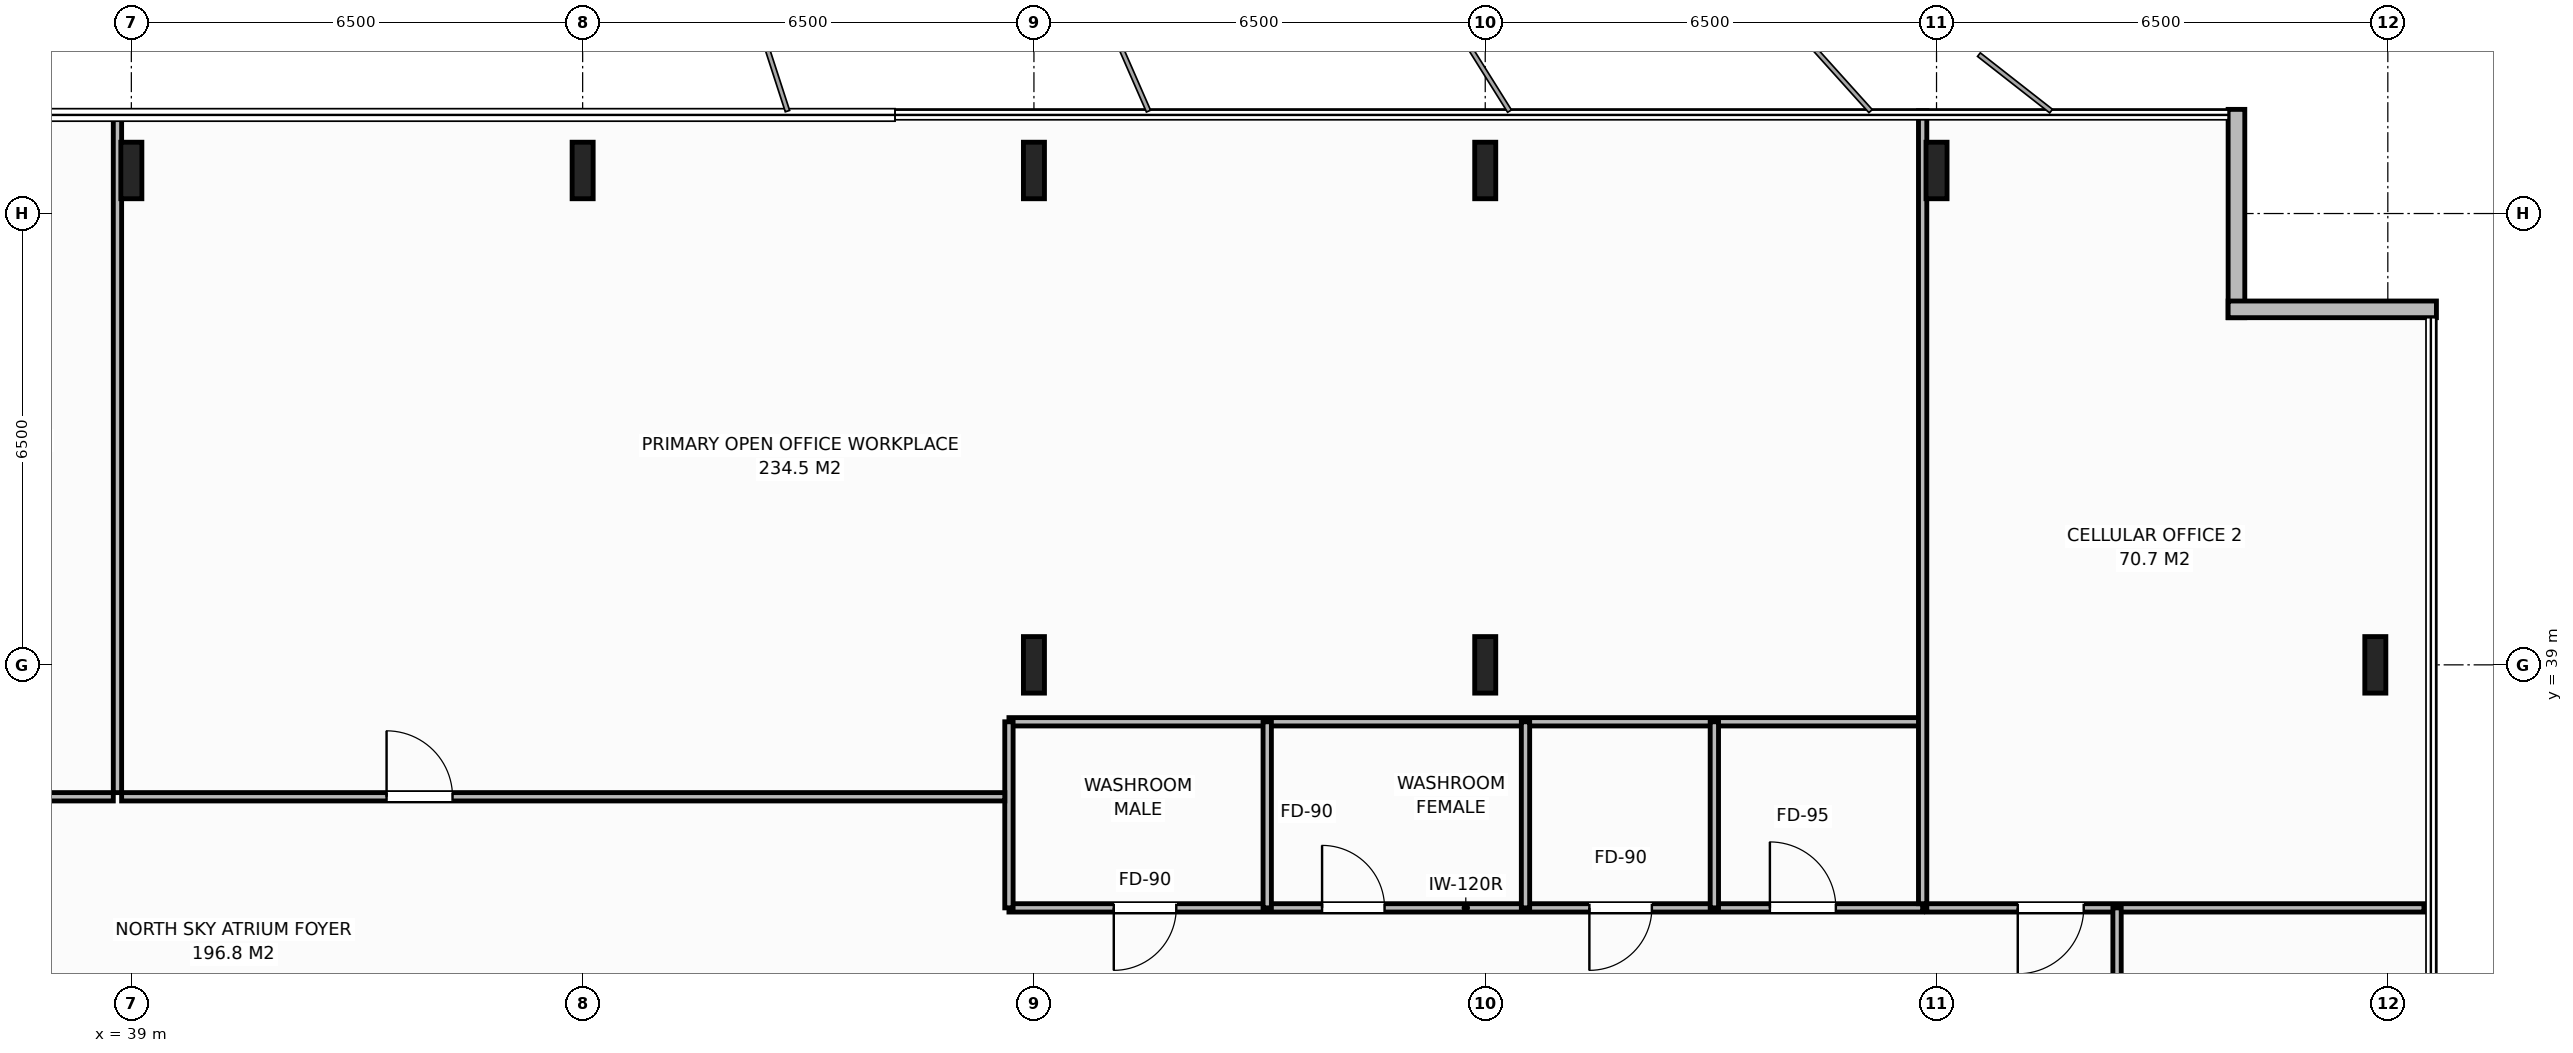
"""IFC4 building model, lengths in metres.
Left out: names, types, materials, properties, quantities, classifications, styles, units other than length and angle.
Written with IfcOpenShell. Run it as: python <this file> out.ifc"""

import sys

from ifc_helpers import new_model, si_unit, direction, frame, frame_2d, origin, origin_2d, place, context, subcontext, project, spatial, rectangle, i_section, extrude, element, fill, save


model = new_model("IFC4")
c1 = context("Model", 3, precision=1e-05, world=origin(), true_north=direction((0.0, 1.0)))
c2 = subcontext(c1, "Body", "Model", "MODEL_VIEW")
j1 = project(units=[si_unit("LENGTHUNIT", "METRE"), si_unit("PLANEANGLEUNIT", "RADIAN")], contexts=[c1])
p1 = place(None, origin())
s1 = spatial("IfcSite", under=j1, at=p1, CompositionType="ELEMENT")
p2 = place(p1, origin())
s2 = spatial("IfcBuilding", under=s1, at=p2, CompositionType="ELEMENT")
p3 = place(p2, frame((0.0, 0.0, 251.8)))
s3 = spatial("IfcBuildingStorey", under=s2, at=p3, CompositionType="ELEMENT", Elevation=251.8)
for number, where, z_axis, x_axis in (
    (1, (58.5, 39.0, 0.0), (0.0, 0.0, 1.0), (1.0, 0.0, 0.0)),
    (2, (52.0, 39.0, 0.0), (0.0, 0.0, 1.0), (1.0, 0.0, 0.0)),
    (3, (39.0, 46.12, 0.0), (0.0, 0.0, 1.0), (1.0, 0.0, 0.0)),
    (4, (45.5, 46.12, 0.0), (0.0, 0.0, 1.0), (1.0, 0.0, 0.0)),
    (5, (52.0, 46.12, 0.0), (0.0, 0.0, 1.0), (1.0, 0.0, 0.0)),
    (6, (58.5, 46.12, 0.0), (0.0, 0.0, 1.0), (1.0, 0.0, 0.0)),
    (7, (65.0, 46.12, 0.0), (0.0, 0.0, 1.0), (1.0, 0.0, 0.0)),
    (8, (71.32, 39.0, 0.0), (0.0, 0.0, 1.0), (1.0, 0.0, 0.0)),
):
    element("IfcColumn", number, at=place(p3, frame(where, z_axis=z_axis, x_axis=x_axis)), inside=s3, PredefinedType="COLUMN", context=c2, shape_type="SweptSolid", body=[
        extrude(i_section(OverallWidth=0.303, OverallDepth=0.814, WebThickness=0.021, FlangeThickness=0.04, at=origin_2d()), origin(), (0.0, 0.0, 1.0), 3.8),
    ])
for number, where, z_axis, x_axis in (
    (9, (69.32, 47.0, 0.0), (0.0, 0.0, 1.0), (0.0, -1.0, 0.0)),
    (10, (69.2, 44.12, 0.0), (0.0, 0.0, 1.0), (1.0, 0.0, 0.0)),
):
    element("IfcWall", number, at=place(p3, frame(where, z_axis=z_axis, x_axis=x_axis)), inside=s3, PredefinedType="STANDARD", context=c2, shape_type="SweptSolid", body=[
        extrude(rectangle(XDim=3.0, YDim=0.24, at=frame_2d((1.5, 0.0))), origin(), (0.0, 0.0, 1.0), 3.588),
    ])
p4 = place(p3, frame((51.64, 35.5, 0.0), z_axis=(0.0, 0.0, 1.0), x_axis=(1.0, 0.0, 0.0)))
e11 = element("IfcWall", 11, at=p4, inside=s3, PredefinedType="PARTITIONING", context=c2, shape_type="SweptSolid", body=[
    extrude(rectangle(XDim=13.16, YDim=0.12, at=frame_2d((6.58, 0.0))), origin(), (0.0, 0.0, 1.0), 3.588),
])
p5 = place(p4, frame((1.51, 0.0, 0.0)))
e12 = element("IfcOpeningElement", 12, at=p5, cuts=e11, PredefinedType="OPENING", context=c2, shape_type="SweptSolid", body=[
    extrude(rectangle(XDim=0.9, YDim=2.15, at=frame_2d((0.45, 1.075))), frame((0.0, 0.07, 0.0), z_axis=(0.0, -1.0, 0.0), x_axis=(1.0, 0.0, 0.0)), (0.0, 0.0, 1.0), 0.14),
])
p6 = place(p4, frame((4.51, 0.0, 0.0)))
e13 = element("IfcOpeningElement", 13, at=p6, cuts=e11, PredefinedType="OPENING", context=c2, shape_type="SweptSolid", body=[
    extrude(rectangle(XDim=0.9, YDim=2.15, at=frame_2d((0.45, 1.075))), frame((0.0, 0.07, 0.0), z_axis=(0.0, -1.0, 0.0), x_axis=(1.0, 0.0, 0.0)), (0.0, 0.0, 1.0), 0.14),
])
p7 = place(p4, frame((8.36, 0.0, 0.0)))
e14 = element("IfcOpeningElement", 14, at=p7, cuts=e11, PredefinedType="OPENING", context=c2, shape_type="SweptSolid", body=[
    extrude(rectangle(XDim=0.9, YDim=2.15, at=frame_2d((0.45, 1.075))), frame((0.0, 0.07, 0.0), z_axis=(0.0, -1.0, 0.0), x_axis=(1.0, 0.0, 0.0)), (0.0, 0.0, 1.0), 0.14),
])
p8 = place(p4, frame((10.96, 0.0, 0.0)))
e15 = element("IfcOpeningElement", 15, at=p8, cuts=e11, PredefinedType="OPENING", context=c2, shape_type="SweptSolid", body=[
    extrude(rectangle(XDim=0.95, YDim=2.15, at=frame_2d((0.475, 1.075))), frame((0.0, 0.07, 0.0), z_axis=(0.0, -1.0, 0.0), x_axis=(1.0, 0.0, 0.0)), (0.0, 0.0, 1.0), 0.14),
])
p9 = place(p3, frame((51.64, 38.18, 0.0), z_axis=(0.0, 0.0, 1.0), x_axis=(1.0, 0.0, 0.0)))
e16 = element("IfcWall", 16, at=p9, inside=s3, PredefinedType="PARTITIONING", context=c2, shape_type="SweptSolid", body=[
    extrude(rectangle(XDim=13.16, YDim=0.12, at=frame_2d((6.58, 0.0))), origin(), (0.0, 0.0, 1.0), 3.588),
])
p10 = place(p3, frame((51.64, 35.5, 0.0), z_axis=(0.0, 0.0, 1.0), x_axis=(0.0, 1.0, 0.0)))
e17 = element("IfcWall", 17, at=p10, inside=s3, PredefinedType="PARTITIONING", context=c2, shape_type="SweptSolid", body=[
    extrude(rectangle(XDim=2.68, YDim=0.12, at=frame_2d((1.34, 0.0))), origin(), (0.0, 0.0, 1.0), 2.388),
])
for number, where, z_axis, x_axis in (
    (18, (55.36, 35.5, 0.0), (0.0, 0.0, 1.0), (0.0, 1.0, 0.0)),
    (19, (59.08, 35.5, 0.0), (0.0, 0.0, 1.0), (0.0, 1.0, 0.0)),
    (20, (61.8, 35.5, 0.0), (0.0, 0.0, 1.0), (0.0, 1.0, 0.0)),
):
    element("IfcWall", number, at=place(p3, frame(where, z_axis=z_axis, x_axis=x_axis)), inside=s3, PredefinedType="PARTITIONING", context=c2, shape_type="SweptSolid", body=[
        extrude(rectangle(XDim=2.68, YDim=0.12, at=frame_2d((1.34, 0.0))), origin(), (0.0, 0.0, 1.0), 3.588),
    ])
p11 = place(p3, frame((38.8, 37.16, 0.0), z_axis=(0.0, 0.0, 1.0), x_axis=(0.0, 1.0, 0.0)))
e21 = element("IfcWall", 21, at=p11, inside=s3, PredefinedType="PARTITIONING", context=c2, shape_type="SweptSolid", body=[
    extrude(rectangle(XDim=9.82, YDim=0.12, at=frame_2d((4.91, 0.0))), origin(), (0.0, 0.0, 1.0), 2.388),
])
p12 = place(p3, frame((34.67, 37.1, 0.0), z_axis=(0.0, 0.0, 1.0), x_axis=(1.0, 0.0, 0.0)))
e22 = element("IfcWall", 22, at=p12, inside=s3, PredefinedType="PARTITIONING", context=c2, shape_type="SweptSolid", body=[
    extrude(rectangle(XDim=4.07, YDim=0.12, at=frame_2d((2.035, 0.0))), origin(), (0.0, 0.0, 1.0), 3.588),
])
p13 = place(p12, frame((1.56, 0.0, 0.0)))
e23 = element("IfcOpeningElement", 23, at=p13, cuts=e22, PredefinedType="OPENING", context=c2, shape_type="SweptSolid", body=[
    extrude(rectangle(XDim=0.95, YDim=2.15, at=frame_2d((0.475, 1.075))), frame((0.0, 0.07, 0.0), z_axis=(0.0, -1.0, 0.0), x_axis=(1.0, 0.0, 0.0)), (0.0, 0.0, 1.0), 0.14),
])
p14 = place(p3, frame((64.8, 35.56, 0.0), z_axis=(0.0, 0.0, 1.0), x_axis=(0.0, 1.0, 0.0)))
e24 = element("IfcWall", 24, at=p14, inside=s3, PredefinedType="PARTITIONING", context=c2, shape_type="SweptSolid", body=[
    extrude(rectangle(XDim=11.42, YDim=0.12, at=frame_2d((5.71, 0.0))), origin(), (0.0, 0.0, 1.0), 2.388),
])
p15 = place(p3, frame((38.86, 37.1, 0.0), z_axis=(0.0, 0.0, 1.0), x_axis=(1.0, 0.0, 0.0)))
e25 = element("IfcWall", 25, at=p15, inside=s3, PredefinedType="PARTITIONING", context=c2, shape_type="SweptSolid", body=[
    extrude(rectangle(XDim=12.72, YDim=0.12, at=frame_2d((6.36, 0.0))), origin(), (0.0, 0.0, 1.0), 3.588),
])
p16 = place(p15, frame((3.816, 0.0, 0.0)))
e26 = element("IfcOpeningElement", 26, at=p16, cuts=e25, PredefinedType="OPENING", context=c2, shape_type="SweptSolid", body=[
    extrude(rectangle(XDim=0.95, YDim=2.15, at=frame_2d((0.475, 1.075))), frame((0.0, 0.07, 0.0), z_axis=(0.0, -1.0, 0.0), x_axis=(1.0, 0.0, 0.0)), (0.0, 0.0, 1.0), 0.14),
])
p17 = place(p3, frame((64.86, 35.5, 0.0), z_axis=(0.0, 0.0, 1.0), x_axis=(1.0, 0.0, 0.0)))
e27 = element("IfcWall", 27, at=p17, inside=s3, PredefinedType="PARTITIONING", context=c2, shape_type="SweptSolid", body=[
    extrude(rectangle(XDim=7.16, YDim=0.12, at=frame_2d((3.58, 0.0))), origin(), (0.0, 0.0, 1.0), 3.588),
])
p18 = place(p17, frame((1.31, 0.0, 0.0)))
e28 = element("IfcOpeningElement", 28, at=p18, cuts=e27, PredefinedType="OPENING", context=c2, shape_type="SweptSolid", body=[
    extrude(rectangle(XDim=0.95, YDim=2.15, at=frame_2d((0.475, 1.075))), frame((0.0, 0.07, 0.0), z_axis=(0.0, -1.0, 0.0), x_axis=(1.0, 0.0, 0.0)), (0.0, 0.0, 1.0), 0.14),
])
p19 = place(p3, frame((67.6, 16.5, 0.0), z_axis=(0.0, 0.0, 1.0), x_axis=(0.0, 1.0, 0.0)))
e29 = element("IfcWall", 29, at=p19, inside=s3, PredefinedType="PARTITIONING", context=c2, shape_type="SweptSolid", body=[
    extrude(rectangle(XDim=19.0, YDim=0.12, at=frame_2d((9.5, 0.0))), origin(), (0.0, 0.0, 1.0), 3.588),
])
p20 = place(p19, frame((9.025, 0.0, 0.0)))
e30 = element("IfcOpeningElement", 30, at=p20, cuts=e29, PredefinedType="OPENING", context=c2, shape_type="SweptSolid", body=[
    extrude(rectangle(XDim=0.95, YDim=2.15, at=frame_2d((0.475, 1.075))), frame((0.0, 0.07, 0.0), z_axis=(0.0, -1.0, 0.0), x_axis=(1.0, 0.0, 0.0)), (0.0, 0.0, 1.0), 0.14),
])
p21 = place(p5, origin())
e31 = element("IfcDoor", 31, at=p21, inside=s3, OperationType="SINGLE_SWING_RIGHT", PredefinedType="DOOR", context=c2, shape_type="SweptSolid", body=[
    extrude(rectangle(XDim=0.9, YDim=2.15, at=frame_2d((0.45, 1.075))), frame((0.0, 0.025, 0.0), z_axis=(0.0, -1.0, 0.0), x_axis=(1.0, 0.0, 0.0)), (0.0, 0.0, 1.0), 0.05),
])
fill(e12, e31)
p22 = place(p6, origin())
e32 = element("IfcDoor", 32, at=p22, inside=s3, OperationType="SINGLE_SWING_LEFT", PredefinedType="DOOR", context=c2, shape_type="SweptSolid", body=[
    extrude(rectangle(XDim=0.9, YDim=2.15, at=frame_2d((0.45, 1.075))), frame((0.0, 0.025, 0.0), z_axis=(0.0, -1.0, 0.0), x_axis=(1.0, 0.0, 0.0)), (0.0, 0.0, 1.0), 0.05),
])
fill(e13, e32)
p23 = place(p7, origin())
e33 = element("IfcDoor", 33, at=p23, inside=s3, OperationType="SINGLE_SWING_RIGHT", PredefinedType="DOOR", context=c2, shape_type="SweptSolid", body=[
    extrude(rectangle(XDim=0.9, YDim=2.15, at=frame_2d((0.45, 1.075))), frame((0.0, 0.025, 0.0), z_axis=(0.0, -1.0, 0.0), x_axis=(1.0, 0.0, 0.0)), (0.0, 0.0, 1.0), 0.05),
])
fill(e14, e33)
p24 = place(p8, origin())
e34 = element("IfcDoor", 34, at=p24, inside=s3, OperationType="SINGLE_SWING_LEFT", PredefinedType="DOOR", context=c2, shape_type="SweptSolid", body=[
    extrude(rectangle(XDim=0.95, YDim=2.15, at=frame_2d((0.475, 1.075))), frame((0.0, 0.025, 0.0), z_axis=(0.0, -1.0, 0.0), x_axis=(1.0, 0.0, 0.0)), (0.0, 0.0, 1.0), 0.05),
])
fill(e15, e34)
p25 = place(p16, origin())
e35 = element("IfcDoor", 35, at=p25, inside=s3, OperationType="SINGLE_SWING_LEFT", PredefinedType="DOOR", context=c2, shape_type="SweptSolid", body=[
    extrude(rectangle(XDim=0.95, YDim=2.15, at=frame_2d((0.475, 1.075))), frame((0.0, 0.025, 0.0), z_axis=(0.0, -1.0, 0.0), x_axis=(1.0, 0.0, 0.0)), (0.0, 0.0, 1.0), 0.05),
])
fill(e26, e35)
p26 = place(p18, origin())
e36 = element("IfcDoor", 36, at=p26, inside=s3, OperationType="SINGLE_SWING_RIGHT", PredefinedType="DOOR", context=c2, shape_type="SweptSolid", body=[
    extrude(rectangle(XDim=0.95, YDim=2.15, at=frame_2d((0.475, 1.075))), frame((0.0, 0.025, 0.0), z_axis=(0.0, -1.0, 0.0), x_axis=(1.0, 0.0, 0.0)), (0.0, 0.0, 1.0), 0.05),
])
fill(e28, e36)
save(model, sys.argv[1])
